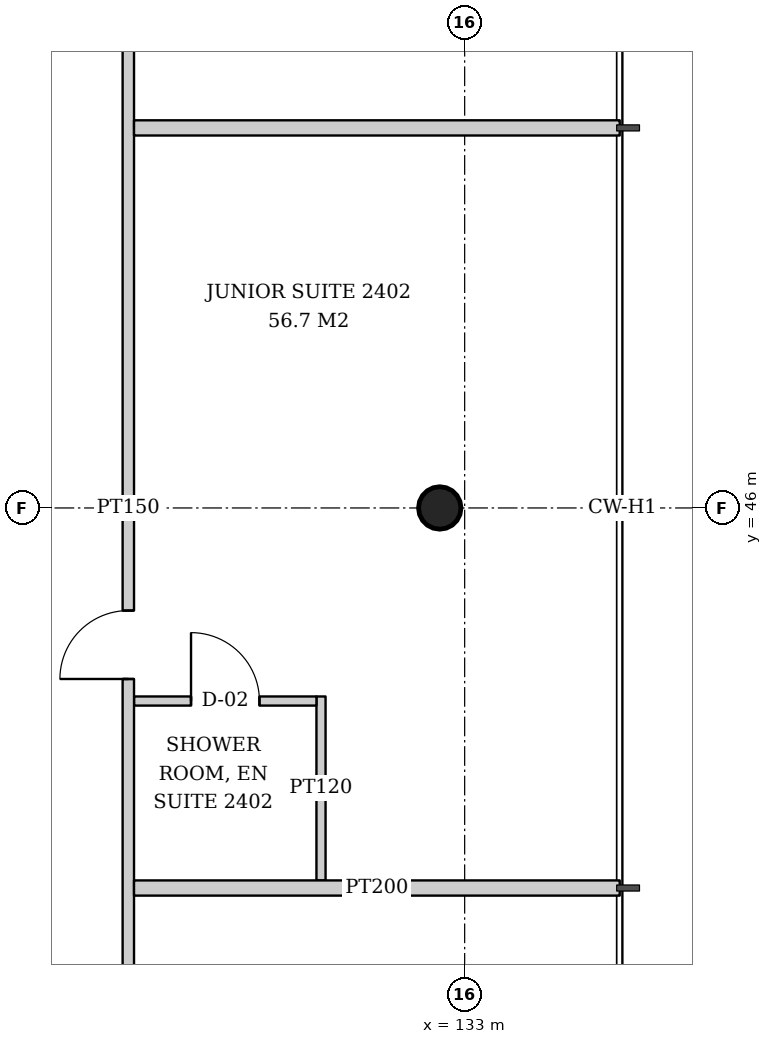
"""IFC4 building model, lengths in metres.
Left out: names, types, materials, properties, quantities, classifications, styles, units other than length and angle.
Written with IfcOpenShell. Run it as: python <this file> out.ifc"""

import sys

from ifc_helpers import new_model, si_unit, direction, frame, frame_2d, origin, origin_2d, place, context, subcontext, project, spatial, rectangle, hollow_circle, extrude, element, fill, save


model = new_model("IFC4")
c1 = context("Model", 3, precision=1e-05, world=origin(), true_north=direction((0.0, 1.0)))
c2 = subcontext(c1, "Body", "Model", "MODEL_VIEW")
j1 = project(units=[si_unit("LENGTHUNIT", "METRE"), si_unit("PLANEANGLEUNIT", "RADIAN")], contexts=[c1])
p1 = place(None, origin())
s1 = spatial("IfcSite", under=j1, at=p1, CompositionType="ELEMENT")
p2 = place(p1, origin())
s2 = spatial("IfcBuilding", under=s1, at=p2, CompositionType="ELEMENT")
p3 = place(p2, frame((0.0, 0.0, 97.0)))
s3 = spatial("IfcBuildingStorey", under=s2, at=p3, CompositionType="ELEMENT", Elevation=97.0)
p4 = place(p3, frame((132.724, 46.0, 0.0), z_axis=(-0.043069538298, 0.0, 0.999072076915), x_axis=(0.0, -1.0, 0.0)))
e1 = element("IfcColumn", 1, at=p4, inside=s3, PredefinedType="COLUMN", context=c2, shape_type="SweptSolid", body=[
    extrude(hollow_circle(Radius=0.28, WallThickness=0.02, at=origin_2d()), origin(), (0.0, 0.0, 1.0), 3.803),
])
p5 = place(p3, frame((131.11, 41.1, 0.0), z_axis=(0.0, 0.0, 1.0), x_axis=(0.0, 1.0, 0.0)))
e2 = element("IfcWall", 2, at=p5, inside=s3, PredefinedType="PARTITIONING", context=c2, shape_type="SweptSolid", body=[
    extrude(rectangle(XDim=2.42, YDim=0.12, at=frame_2d((1.21, 0.0))), origin(), (0.0, 0.0, 1.0), 3.6),
])
p6 = place(p3, frame((128.65, 43.46, 0.0), z_axis=(0.0, 0.0, 1.0), x_axis=(1.0, 0.0, 0.0)))
e3 = element("IfcWall", 3, at=p6, inside=s3, PredefinedType="PARTITIONING", context=c2, shape_type="SweptSolid", body=[
    extrude(rectangle(XDim=2.4, YDim=0.12, at=frame_2d((1.2, 0.0))), origin(), (0.0, 0.0, 1.0), 3.6),
])
p7 = place(p6, frame((0.75, 0.0, 0.0)))
e4 = element("IfcOpeningElement", 4, at=p7, cuts=e3, PredefinedType="OPENING", context=c2, shape_type="SweptSolid", body=[
    extrude(rectangle(XDim=0.9, YDim=2.1, at=frame_2d((0.45, 1.05))), frame((0.0, 0.07, 0.0), z_axis=(0.0, -1.0, 0.0), x_axis=(1.0, 0.0, 0.0)), (0.0, 0.0, 1.0), 0.14),
])
p8 = place(p3, frame((128.575, 34.236, 0.0), z_axis=(0.0, 0.0, 1.0), x_axis=(0.0, 1.0, 0.0)))
e5 = element("IfcWall", 5, at=p8, inside=s3, PredefinedType="PARTITIONING", context=c2, shape_type="SweptSolid", body=[
    extrude(rectangle(XDim=23.527, YDim=0.15, at=frame_2d((11.764, 0.0))), origin(), (0.0, 0.0, 1.0), 2.9),
])
p9 = place(p8, frame((0.514, 0.0, 0.0)))
e6 = element("IfcOpeningElement", 6, at=p9, cuts=e5, PredefinedType="OPENING", context=c2, shape_type="SweptSolid", body=[
    extrude(rectangle(XDim=0.9, YDim=2.1, at=frame_2d((0.45, 1.05))), frame((0.0, 0.085, 0.0), z_axis=(0.0, -1.0, 0.0), x_axis=(1.0, 0.0, 0.0)), (0.0, 0.0, 1.0), 0.17),
])
p10 = place(p8, frame((9.514, 0.0, 0.0)))
e7 = element("IfcOpeningElement", 7, at=p10, cuts=e5, PredefinedType="OPENING", context=c2, shape_type="SweptSolid", body=[
    extrude(rectangle(XDim=0.9, YDim=2.1, at=frame_2d((0.45, 1.05))), frame((0.0, 0.085, 0.0), z_axis=(0.0, -1.0, 0.0), x_axis=(1.0, 0.0, 0.0)), (0.0, 0.0, 1.0), 0.17),
])
p11 = place(p8, frame((18.114, 0.0, 0.0)))
e8 = element("IfcOpeningElement", 8, at=p11, cuts=e5, PredefinedType="OPENING", context=c2, shape_type="SweptSolid", body=[
    extrude(rectangle(XDim=0.9, YDim=2.1, at=frame_2d((0.45, 1.05))), frame((0.0, 0.085, 0.0), z_axis=(0.0, -1.0, 0.0), x_axis=(1.0, 0.0, 0.0)), (0.0, 0.0, 1.0), 0.17),
])
p12 = place(p3, frame((128.65, 41.0, 0.0), z_axis=(0.0, 0.0, 1.0), x_axis=(1.0, 0.0, 0.0)))
e9 = element("IfcWall", 9, at=p12, inside=s3, PredefinedType="PARTITIONING", context=c2, shape_type="SweptSolid", body=[
    extrude(rectangle(XDim=6.39, YDim=0.2, at=frame_2d((3.195, 0.0))), origin(), (0.0, 0.0, 1.0), 3.0),
])
p13 = place(p3, frame((128.65, 51.0, 0.0), z_axis=(0.0, 0.0, 1.0), x_axis=(1.0, 0.0, 0.0)))
e10 = element("IfcWall", 10, at=p13, inside=s3, PredefinedType="PARTITIONING", context=c2, shape_type="SweptSolid", body=[
    extrude(rectangle(XDim=6.39, YDim=0.2, at=frame_2d((3.195, 0.0))), origin(), (0.0, 0.0, 1.0), 3.2),
])
p14 = place(p7, origin())
e11 = element("IfcDoor", 11, at=p14, inside=s3, OperationType="SINGLE_SWING_LEFT", PredefinedType="DOOR", context=c2, shape_type="SweptSolid", body=[
    extrude(rectangle(XDim=0.9, YDim=2.1, at=frame_2d((0.45, 1.05))), frame((0.0, 0.025, 0.0), z_axis=(0.0, -1.0, 0.0), x_axis=(1.0, 0.0, 0.0)), (0.0, 0.0, 1.0), 0.05),
])
fill(e4, e11)
p15 = place(p10, origin())
e12 = element("IfcDoor", 12, at=p15, inside=s3, OperationType="SINGLE_SWING_LEFT", PredefinedType="DOOR", context=c2, shape_type="SweptSolid", body=[
    extrude(rectangle(XDim=0.9, YDim=2.1, at=frame_2d((0.45, 1.05))), frame((0.0, 0.025, 0.0), z_axis=(0.0, -1.0, 0.0), x_axis=(1.0, 0.0, 0.0)), (0.0, 0.0, 1.0), 0.05),
])
fill(e7, e12)
save(model, sys.argv[1])
